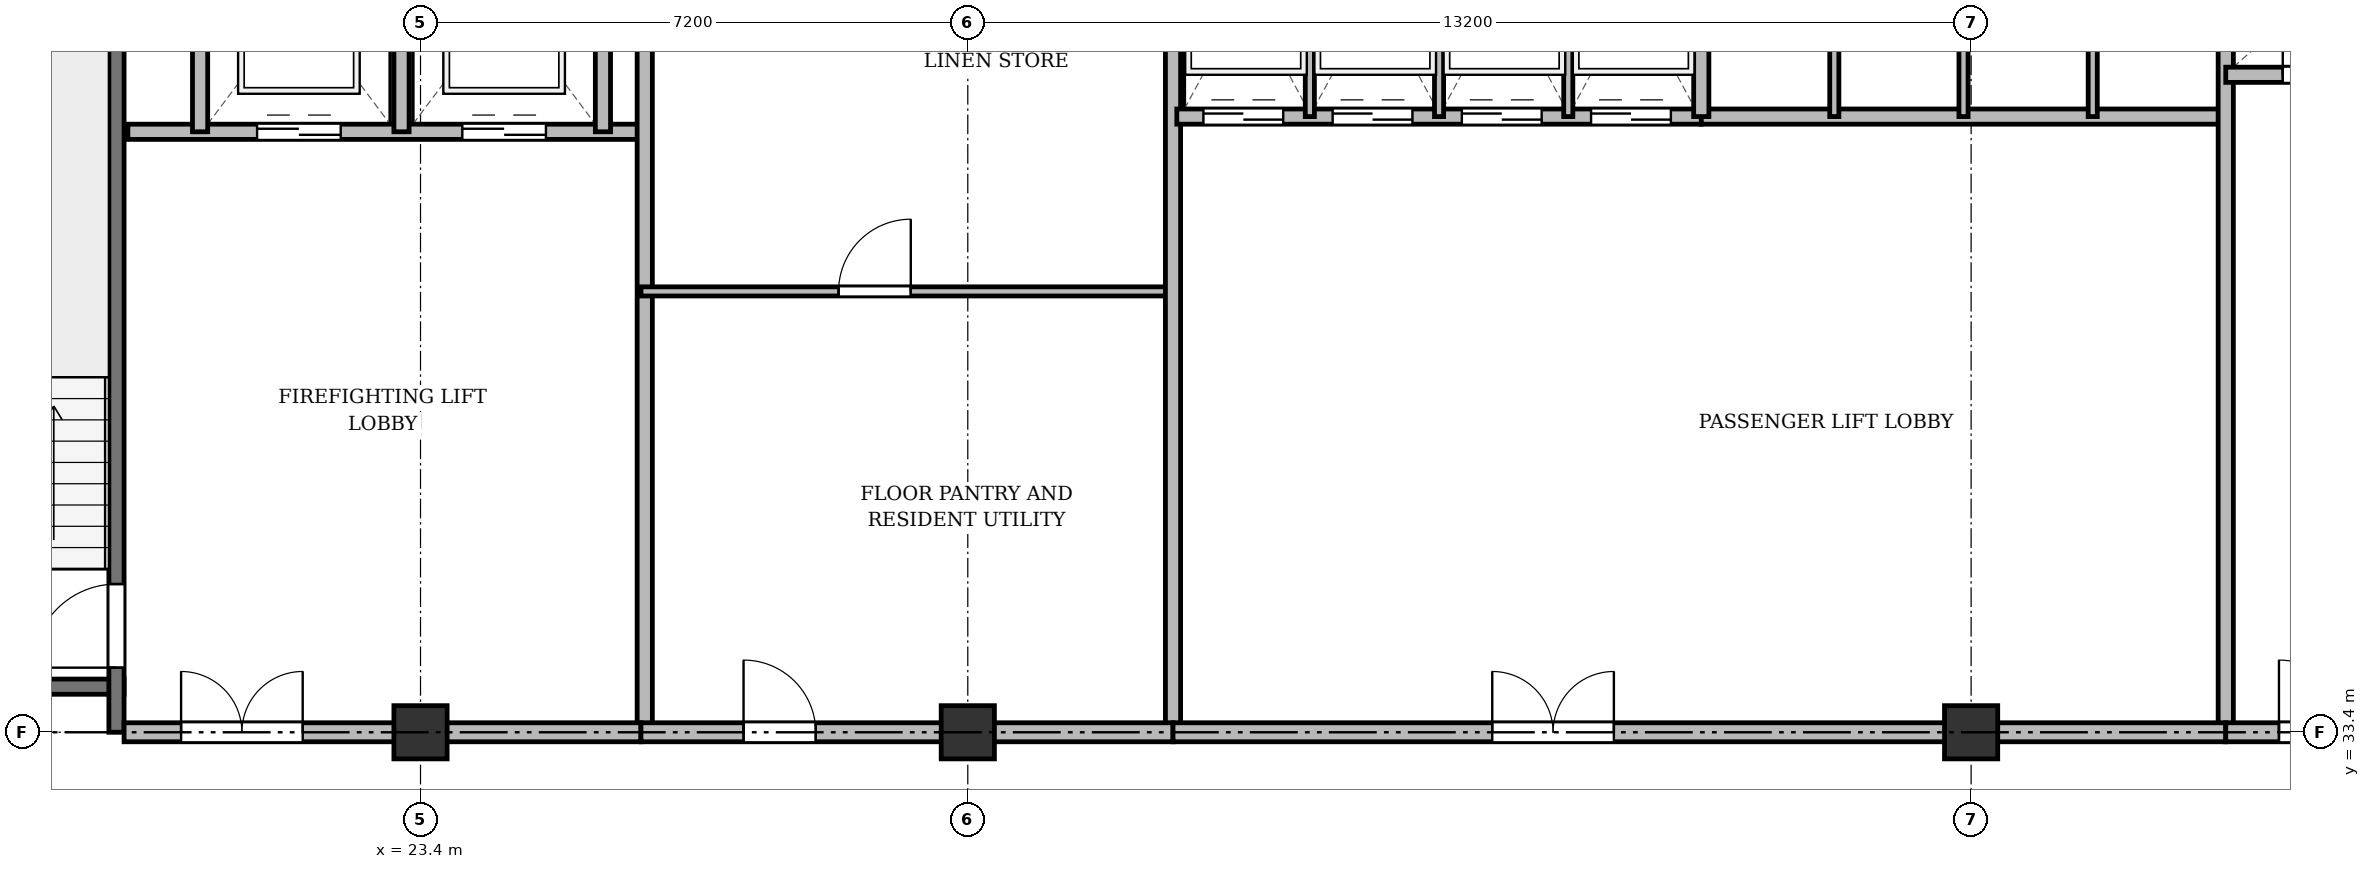
"""IFC4 building model, lengths in metres.
Left out: names, types, materials, properties, quantities, classifications, styles, units other than length and angle.
Written with IfcOpenShell. Run it as: python <this file> out.ifc"""

import sys

from ifc_helpers import new_model, si_unit, direction, frame, frame_2d, origin, origin_2d, place, context, subcontext, project, spatial, rectangle, extrude, source, transform, mapped, element, fill, save


model = new_model("IFC4")
c1 = context("Model", 3, precision=1e-05, world=origin(), true_north=direction((0.0, 1.0)))
c2 = subcontext(c1, "Body", "Model", "MODEL_VIEW")
j1 = project(units=[si_unit("LENGTHUNIT", "METRE"), si_unit("PLANEANGLEUNIT", "RADIAN")], contexts=[c1])
p1 = place(None, origin())
s1 = spatial("IfcSite", under=j1, at=p1, CompositionType="ELEMENT")
p2 = place(p1, origin())
s2 = spatial("IfcBuilding", under=s1, at=p2, CompositionType="ELEMENT")
p3 = place(p2, frame((0.0, 0.0, 212.1)))
s3 = spatial("IfcBuildingStorey", under=s2, at=p3, CompositionType="ELEMENT", Elevation=212.1)
m1 = source(origin(), c2, "Body", "SweptSolid", [
    extrude(rectangle(XDim=0.7, YDim=0.7, at=origin_2d()), origin(), (0.0, 0.0, 1.0), 3.6),
])
for number, where, z_axis, x_axis in (
    (1, (23.4, 33.4, 0.0), (0.0, 0.0, 1.0), (1.0, 0.0, 0.0)),
    (2, (30.6, 33.4, 0.0), (0.0, 0.0, 1.0), (1.0, 0.0, 0.0)),
    (3, (43.8, 33.4, 0.0), (0.0, 0.0, 1.0), (1.0, 0.0, 0.0)),
):
    element("IfcColumn", number, at=place(p3, frame(where, z_axis=z_axis, x_axis=x_axis)), inside=s3, PredefinedType="COLUMN", context=c2, shape_type="MappedRepresentation", body=[
        mapped(m1, transform((0.0, 0.0, 0.0), x_axis=(1.0, 0.0, 0.0), y_axis=(0.0, 1.0, 0.0), z_axis=(0.0, 0.0, 1.0), scale=1.0)),
    ])
p4 = place(p3, frame((16.1, 34.0, 0.0), z_axis=(0.0, 0.0, 1.0), x_axis=(1.0, 0.0, 0.0)))
e4 = element("IfcWall", 4, at=p4, inside=s3, PredefinedType="SHEAR", context=c2, shape_type="SweptSolid", body=[
    extrude(rectangle(XDim=3.4, YDim=0.2, at=frame_2d((1.7, 0.0))), origin(), (0.0, 0.0, 1.0), 3.36),
])
p5 = place(p3, frame((19.4, 33.4, 0.0), z_axis=(0.0, 0.0, 1.0), x_axis=(0.0, 1.0, 0.0)))
e5 = element("IfcWall", 5, at=p5, inside=s3, PredefinedType="SHEAR", context=c2, shape_type="SweptSolid", body=[
    extrude(rectangle(XDim=11.1, YDim=0.2, at=frame_2d((5.55, 0.0))), origin(), (0.0, 0.0, 1.0), 3.36),
])
p6 = place(p5, frame((0.85, 0.0, 0.0)))
e6 = element("IfcOpeningElement", 6, at=p6, cuts=e5, PredefinedType="OPENING", context=c2, shape_type="SweptSolid", body=[
    extrude(rectangle(XDim=1.1, YDim=2.15, at=frame_2d((0.55, 1.075))), frame((0.0, 0.11, 0.0), z_axis=(0.0, -1.0, 0.0), x_axis=(1.0, 0.0, 0.0)), (0.0, 0.0, 1.0), 0.22),
])
p7 = place(p3, frame((19.55, 41.3, 0.0), z_axis=(0.0, 0.0, 1.0), x_axis=(1.0, 0.0, 0.0)))
e7 = element("IfcWall", 7, at=p7, inside=s3, PredefinedType="SOLIDWALL", context=c2, shape_type="SweptSolid", body=[
    extrude(rectangle(XDim=6.75, YDim=0.2, at=frame_2d((3.375, 0.0))), origin(), (0.0, 0.0, 1.0), 3.36),
])
p8 = place(p7, frame((1.7, 0.0, 0.0)))
e8 = element("IfcOpeningElement", 8, at=p8, cuts=e7, PredefinedType="OPENING", context=c2, shape_type="SweptSolid", body=[
    extrude(rectangle(XDim=1.1, YDim=2.15, at=frame_2d((0.55, 1.075))), frame((0.0, 0.11, 0.0), z_axis=(0.0, -1.0, 0.0), x_axis=(1.0, 0.0, 0.0)), (0.0, 0.0, 1.0), 0.22),
])
p9 = place(p7, frame((4.4, 0.0, 0.0)))
e9 = element("IfcOpeningElement", 9, at=p9, cuts=e7, PredefinedType="OPENING", context=c2, shape_type="SweptSolid", body=[
    extrude(rectangle(XDim=1.1, YDim=2.15, at=frame_2d((0.55, 1.075))), frame((0.0, 0.11, 0.0), z_axis=(0.0, -1.0, 0.0), x_axis=(1.0, 0.0, 0.0)), (0.0, 0.0, 1.0), 0.22),
])
for number, where, z_axis, x_axis in (
    (10, (20.5, 41.3, 0.0), (0.0, 0.0, 1.0), (0.0, 1.0, 0.0)),
    (11, (23.15, 41.3, 0.0), (0.0, 0.0, 1.0), (0.0, 1.0, 0.0)),
    (12, (25.8, 41.3, 0.0), (0.0, 0.0, 1.0), (0.0, 1.0, 0.0)),
):
    element("IfcWall", number, at=place(p3, frame(where, z_axis=z_axis, x_axis=x_axis)), inside=s3, PredefinedType="SOLIDWALL", context=c2, shape_type="SweptSolid", body=[
        extrude(rectangle(XDim=3.4, YDim=0.2, at=frame_2d((1.7, 0.0))), origin(), (0.0, 0.0, 1.0), 3.36),
    ])
p10 = place(p3, frame((26.35, 33.4, 0.0), z_axis=(0.0, 0.0, 1.0), x_axis=(0.0, 1.0, 0.0)))
e13 = element("IfcWall", 13, at=p10, inside=s3, PredefinedType="SOLIDWALL", context=c2, shape_type="SweptSolid", body=[
    extrude(rectangle(XDim=11.3, YDim=0.2, at=frame_2d((5.65, 0.0))), origin(), (0.0, 0.0, 1.0), 2.91),
])
p11 = place(p3, frame((19.5, 33.4, 0.0), z_axis=(0.0, 0.0, 1.0), x_axis=(1.0, 0.0, 0.0)))
e14 = element("IfcWall", 14, at=p11, inside=s3, PredefinedType="PARTITIONING", context=c2, shape_type="SweptSolid", body=[
    extrude(rectangle(XDim=6.8, YDim=0.25, at=frame_2d((3.4, 0.0))), origin(), (0.0, 0.0, 1.0), 2.91),
])
p12 = place(p11, frame((0.75, 0.0, 0.0)))
e15 = element("IfcOpeningElement", 15, at=p12, cuts=e14, PredefinedType="OPENING", context=c2, shape_type="SweptSolid", body=[
    extrude(rectangle(XDim=1.6, YDim=2.2, at=frame_2d((0.8, 1.1))), frame((0.0, 0.135, 0.0), z_axis=(0.0, -1.0, 0.0), x_axis=(1.0, 0.0, 0.0)), (0.0, 0.0, 1.0), 0.27),
])
p13 = place(p3, frame((26.3, 39.2, 0.0), z_axis=(0.0, 0.0, 1.0), x_axis=(1.0, 0.0, 0.0)))
e16 = element("IfcWall", 16, at=p13, inside=s3, PredefinedType="PARTITIONING", context=c2, shape_type="SweptSolid", body=[
    extrude(rectangle(XDim=7.0, YDim=0.12, at=frame_2d((3.5, 0.0))), origin(), (0.0, 0.0, 1.0), 2.86),
])
p14 = place(p13, frame((2.6, 0.0, 0.0)))
e17 = element("IfcOpeningElement", 17, at=p14, cuts=e16, PredefinedType="OPENING", context=c2, shape_type="SweptSolid", body=[
    extrude(rectangle(XDim=0.95, YDim=2.15, at=frame_2d((0.475, 1.075))), frame((0.0, 0.07, 0.0), z_axis=(0.0, -1.0, 0.0), x_axis=(1.0, 0.0, 0.0)), (0.0, 0.0, 1.0), 0.14),
])
p15 = place(p3, frame((33.3, 33.4, 0.0), z_axis=(0.0, 0.0, 1.0), x_axis=(0.0, 1.0, 0.0)))
e18 = element("IfcWall", 18, at=p15, inside=s3, PredefinedType="SOLIDWALL", context=c2, shape_type="SweptSolid", body=[
    extrude(rectangle(XDim=11.3, YDim=0.2, at=frame_2d((5.65, 0.0))), origin(), (0.0, 0.0, 1.0), 2.91),
])
p16 = place(p3, frame((33.35, 41.5, 0.0), z_axis=(0.0, 0.0, 1.0), x_axis=(1.0, 0.0, 0.0)))
e19 = element("IfcWall", 19, at=p16, inside=s3, PredefinedType="SOLIDWALL", context=c2, shape_type="SweptSolid", body=[
    extrude(rectangle(XDim=6.9, YDim=0.2, at=frame_2d((3.45, 0.0))), origin(), (0.0, 0.0, 1.0), 3.36),
])
p17 = place(p16, frame((0.35, 0.0, 0.0)))
e20 = element("IfcOpeningElement", 20, at=p17, cuts=e19, PredefinedType="OPENING", context=c2, shape_type="SweptSolid", body=[
    extrude(rectangle(XDim=1.05, YDim=2.15, at=frame_2d((0.525, 1.075))), frame((0.0, 0.11, 0.0), z_axis=(0.0, -1.0, 0.0), x_axis=(1.0, 0.0, 0.0)), (0.0, 0.0, 1.0), 0.22),
])
p18 = place(p16, frame((2.05, 0.0, 0.0)))
e21 = element("IfcOpeningElement", 21, at=p18, cuts=e19, PredefinedType="OPENING", context=c2, shape_type="SweptSolid", body=[
    extrude(rectangle(XDim=1.05, YDim=2.15, at=frame_2d((0.525, 1.075))), frame((0.0, 0.11, 0.0), z_axis=(0.0, -1.0, 0.0), x_axis=(1.0, 0.0, 0.0)), (0.0, 0.0, 1.0), 0.22),
])
p19 = place(p16, frame((3.75, 0.0, 0.0)))
e22 = element("IfcOpeningElement", 22, at=p19, cuts=e19, PredefinedType="OPENING", context=c2, shape_type="SweptSolid", body=[
    extrude(rectangle(XDim=1.05, YDim=2.15, at=frame_2d((0.525, 1.075))), frame((0.0, 0.11, 0.0), z_axis=(0.0, -1.0, 0.0), x_axis=(1.0, 0.0, 0.0)), (0.0, 0.0, 1.0), 0.22),
])
p20 = place(p16, frame((5.45, 0.0, 0.0)))
e23 = element("IfcOpeningElement", 23, at=p20, cuts=e19, PredefinedType="OPENING", context=c2, shape_type="SweptSolid", body=[
    extrude(rectangle(XDim=1.05, YDim=2.15, at=frame_2d((0.525, 1.075))), frame((0.0, 0.11, 0.0), z_axis=(0.0, -1.0, 0.0), x_axis=(1.0, 0.0, 0.0)), (0.0, 0.0, 1.0), 0.22),
])
for number, where, z_axis, x_axis in (
    (24, (35.1, 41.5, 0.0), (0.0, 0.0, 1.0), (0.0, 1.0, 0.0)),
    (25, (36.8, 41.5, 0.0), (0.0, 0.0, 1.0), (0.0, 1.0, 0.0)),
    (26, (38.5, 41.5, 0.0), (0.0, 0.0, 1.0), (0.0, 1.0, 0.0)),
):
    element("IfcWall", number, at=place(p3, frame(where, z_axis=z_axis, x_axis=x_axis)), inside=s3, PredefinedType="PARTITIONING", context=c2, shape_type="SweptSolid", body=[
        extrude(rectangle(XDim=3.2, YDim=0.12, at=frame_2d((1.6, 0.0))), origin(), (0.0, 0.0, 1.0), 3.36),
    ])
p21 = place(p3, frame((40.25, 41.5, 0.0), z_axis=(0.0, 0.0, 1.0), x_axis=(1.0, 0.0, 0.0)))
e27 = element("IfcWall", 27, at=p21, inside=s3, PredefinedType="SOLIDWALL", context=c2, shape_type="SweptSolid", body=[
    extrude(rectangle(XDim=6.9, YDim=0.2, at=frame_2d((3.45, 0.0))), origin(), (0.0, 0.0, 1.0), 3.36),
])
p22 = place(p3, frame((40.25, 41.5, 0.0), z_axis=(0.0, 0.0, 1.0), x_axis=(0.0, 1.0, 0.0)))
e28 = element("IfcWall", 28, at=p22, inside=s3, PredefinedType="SOLIDWALL", context=c2, shape_type="SweptSolid", body=[
    extrude(rectangle(XDim=3.2, YDim=0.2, at=frame_2d((1.6, 0.0))), origin(), (0.0, 0.0, 1.0), 3.36),
])
for number, where, z_axis, x_axis in (
    (29, (42.0, 41.5, 0.0), (0.0, 0.0, 1.0), (0.0, 1.0, 0.0)),
    (30, (43.7, 41.5, 0.0), (0.0, 0.0, 1.0), (0.0, 1.0, 0.0)),
    (31, (45.4, 41.5, 0.0), (0.0, 0.0, 1.0), (0.0, 1.0, 0.0)),
):
    element("IfcWall", number, at=place(p3, frame(where, z_axis=z_axis, x_axis=x_axis)), inside=s3, PredefinedType="PARTITIONING", context=c2, shape_type="SweptSolid", body=[
        extrude(rectangle(XDim=3.2, YDim=0.12, at=frame_2d((1.6, 0.0))), origin(), (0.0, 0.0, 1.0), 3.36),
    ])
p23 = place(p3, frame((47.15, 33.4, 0.0), z_axis=(0.0, 0.0, 1.0), x_axis=(0.0, 1.0, 0.0)))
e32 = element("IfcWall", 32, at=p23, inside=s3, PredefinedType="SOLIDWALL", context=c2, shape_type="SweptSolid", body=[
    extrude(rectangle(XDim=11.3, YDim=0.2, at=frame_2d((5.65, 0.0))), origin(), (0.0, 0.0, 1.0), 2.91),
])
p24 = place(p3, frame((26.3, 33.4, 0.0), z_axis=(0.0, 0.0, 1.0), x_axis=(1.0, 0.0, 0.0)))
e33 = element("IfcWall", 33, at=p24, inside=s3, PredefinedType="PARTITIONING", context=c2, shape_type="SweptSolid", body=[
    extrude(rectangle(XDim=7.0, YDim=0.25, at=frame_2d((3.5, 0.0))), origin(), (0.0, 0.0, 1.0), 2.91),
])
p25 = place(p24, frame((1.35, 0.0, 0.0)))
e34 = element("IfcOpeningElement", 34, at=p25, cuts=e33, PredefinedType="OPENING", context=c2, shape_type="SweptSolid", body=[
    extrude(rectangle(XDim=0.95, YDim=2.15, at=frame_2d((0.475, 1.075))), frame((0.0, 0.135, 0.0), z_axis=(0.0, -1.0, 0.0), x_axis=(1.0, 0.0, 0.0)), (0.0, 0.0, 1.0), 0.27),
])
p26 = place(p3, frame((33.3, 33.4, 0.0), z_axis=(0.0, 0.0, 1.0), x_axis=(1.0, 0.0, 0.0)))
e35 = element("IfcWall", 35, at=p26, inside=s3, PredefinedType="PARTITIONING", context=c2, shape_type="SweptSolid", body=[
    extrude(rectangle(XDim=13.85, YDim=0.25, at=frame_2d((6.925, 0.0))), origin(), (0.0, 0.0, 1.0), 2.91),
])
p27 = place(p26, frame((4.2, 0.0, 0.0)))
e36 = element("IfcOpeningElement", 36, at=p27, cuts=e35, PredefinedType="OPENING", context=c2, shape_type="SweptSolid", body=[
    extrude(rectangle(XDim=1.6, YDim=2.2, at=frame_2d((0.8, 1.1))), frame((0.0, 0.135, 0.0), z_axis=(0.0, -1.0, 0.0), x_axis=(1.0, 0.0, 0.0)), (0.0, 0.0, 1.0), 0.27),
])
p28 = place(p3, frame((47.15, 42.05, 0.0), z_axis=(0.0, 0.0, 1.0), x_axis=(1.0, 0.0, 0.0)))
e37 = element("IfcWall", 37, at=p28, inside=s3, PredefinedType="SOLIDWALL", context=c2, shape_type="SweptSolid", body=[
    extrude(rectangle(XDim=7.85, YDim=0.2, at=frame_2d((3.925, 0.0))), origin(), (0.0, 0.0, 1.0), 2.86),
])
p29 = place(p28, frame((0.75, 0.0, 0.0)))
e38 = element("IfcOpeningElement", 38, at=p29, cuts=e37, PredefinedType="OPENING", context=c2, shape_type="SweptSolid", body=[
    extrude(rectangle(XDim=0.9, YDim=2.1, at=frame_2d((0.45, 1.05))), frame((0.0, 0.11, 0.0), z_axis=(0.0, -1.0, 0.0), x_axis=(1.0, 0.0, 0.0)), (0.0, 0.0, 1.0), 0.22),
])
p30 = place(p28, frame((3.85, 0.0, 0.0)))
e39 = element("IfcOpeningElement", 39, at=p30, cuts=e37, PredefinedType="OPENING", context=c2, shape_type="SweptSolid", body=[
    extrude(rectangle(XDim=0.9, YDim=2.1, at=frame_2d((0.45, 1.05))), frame((0.0, 0.11, 0.0), z_axis=(0.0, -1.0, 0.0), x_axis=(1.0, 0.0, 0.0)), (0.0, 0.0, 1.0), 0.22),
])
p31 = place(p3, frame((47.15, 33.4, 0.0), z_axis=(0.0, 0.0, 1.0), x_axis=(1.0, 0.0, 0.0)))
e40 = element("IfcWall", 40, at=p31, inside=s3, PredefinedType="PARTITIONING", context=c2, shape_type="SweptSolid", body=[
    extrude(rectangle(XDim=11.15, YDim=0.25, at=frame_2d((5.575, 0.0))), origin(), (0.0, 0.0, 1.0), 2.91),
])
p32 = place(p31, frame((0.7, 0.0, 0.0)))
e41 = element("IfcOpeningElement", 41, at=p32, cuts=e40, PredefinedType="OPENING", context=c2, shape_type="SweptSolid", body=[
    extrude(rectangle(XDim=0.95, YDim=2.15, at=frame_2d((0.475, 1.075))), frame((0.0, 0.135, 0.0), z_axis=(0.0, -1.0, 0.0), x_axis=(1.0, 0.0, 0.0)), (0.0, 0.0, 1.0), 0.27),
])
p33 = place(p31, frame((6.0, 0.0, 0.0)))
e42 = element("IfcOpeningElement", 42, at=p33, cuts=e40, PredefinedType="OPENING", context=c2, shape_type="SweptSolid", body=[
    extrude(rectangle(XDim=1.2, YDim=2.15, at=frame_2d((0.6, 1.075))), frame((0.0, 0.135, 0.0), z_axis=(0.0, -1.0, 0.0), x_axis=(1.0, 0.0, 0.0)), (0.0, 0.0, 1.0), 0.27),
])
m2 = source(origin(), c2, "Body", "SweptSolid", [
    extrude(rectangle(XDim=1.1, YDim=2.15, at=frame_2d((0.55, 1.075))), frame((0.0, 0.025, 0.0), z_axis=(0.0, -1.0, 0.0), x_axis=(1.0, 0.0, 0.0)), (0.0, 0.0, 1.0), 0.05),
])
p34 = place(p6, origin())
e43 = element("IfcDoor", 43, at=p34, inside=s3, OperationType="SINGLE_SWING_LEFT", PredefinedType="DOOR", context=c2, shape_type="MappedRepresentation", body=[
    mapped(m2, transform((0.0, 0.0, 0.0), x_axis=(1.0, 0.0, 0.0), y_axis=(0.0, 1.0, 0.0), z_axis=(0.0, 0.0, 1.0), scale=1.0)),
])
fill(e6, e43)
p35 = place(p8, origin())
e44 = element("IfcDoor", 44, at=p35, inside=s3, OperationType="DOUBLE_DOOR_SLIDING", PredefinedType="DOOR", context=c2, shape_type="MappedRepresentation", body=[
    mapped(m2, transform((0.0, 0.0, 0.0), x_axis=(1.0, 0.0, 0.0), y_axis=(0.0, 1.0, 0.0), z_axis=(0.0, 0.0, 1.0), scale=1.0)),
])
fill(e8, e44)
p36 = place(p9, origin())
e45 = element("IfcDoor", 45, at=p36, inside=s3, OperationType="DOUBLE_DOOR_SLIDING", PredefinedType="DOOR", context=c2, shape_type="MappedRepresentation", body=[
    mapped(m2, transform((0.0, 0.0, 0.0), x_axis=(1.0, 0.0, 0.0), y_axis=(0.0, 1.0, 0.0), z_axis=(0.0, 0.0, 1.0), scale=1.0)),
])
fill(e9, e45)
m3 = source(origin(), c2, "Body", "SweptSolid", [
    extrude(rectangle(XDim=1.6, YDim=2.2, at=frame_2d((0.8, 1.1))), frame((0.0, 0.025, 0.0), z_axis=(0.0, -1.0, 0.0), x_axis=(1.0, 0.0, 0.0)), (0.0, 0.0, 1.0), 0.05),
])
p37 = place(p12, origin())
e46 = element("IfcDoor", 46, at=p37, inside=s3, OperationType="DOUBLE_DOOR_SINGLE_SWING", PredefinedType="DOOR", context=c2, shape_type="MappedRepresentation", body=[
    mapped(m3, transform((0.0, 0.0, 0.0), x_axis=(1.0, 0.0, 0.0), y_axis=(0.0, 1.0, 0.0), z_axis=(0.0, 0.0, 1.0), scale=1.0)),
])
fill(e15, e46)
m4 = source(origin(), c2, "Body", "SweptSolid", [
    extrude(rectangle(XDim=0.95, YDim=2.15, at=frame_2d((0.475, 1.075))), frame((0.0, 0.025, 0.0), z_axis=(0.0, -1.0, 0.0), x_axis=(1.0, 0.0, 0.0)), (0.0, 0.0, 1.0), 0.05),
])
p38 = place(p14, origin())
e47 = element("IfcDoor", 47, at=p38, inside=s3, OperationType="SINGLE_SWING_RIGHT", PredefinedType="DOOR", context=c2, shape_type="MappedRepresentation", body=[
    mapped(m4, transform((0.0, 0.0, 0.0), x_axis=(1.0, 0.0, 0.0), y_axis=(0.0, 1.0, 0.0), z_axis=(0.0, 0.0, 1.0), scale=1.0)),
])
fill(e17, e47)
m5 = source(origin(), c2, "Body", "SweptSolid", [
    extrude(rectangle(XDim=1.05, YDim=2.15, at=frame_2d((0.525, 1.075))), frame((0.0, 0.025, 0.0), z_axis=(0.0, -1.0, 0.0), x_axis=(1.0, 0.0, 0.0)), (0.0, 0.0, 1.0), 0.05),
])
p39 = place(p17, origin())
e48 = element("IfcDoor", 48, at=p39, inside=s3, OperationType="DOUBLE_DOOR_SLIDING", PredefinedType="DOOR", context=c2, shape_type="MappedRepresentation", body=[
    mapped(m5, transform((0.0, 0.0, 0.0), x_axis=(1.0, 0.0, 0.0), y_axis=(0.0, 1.0, 0.0), z_axis=(0.0, 0.0, 1.0), scale=1.0)),
])
fill(e20, e48)
p40 = place(p18, origin())
e49 = element("IfcDoor", 49, at=p40, inside=s3, OperationType="DOUBLE_DOOR_SLIDING", PredefinedType="DOOR", context=c2, shape_type="MappedRepresentation", body=[
    mapped(m5, transform((0.0, 0.0, 0.0), x_axis=(1.0, 0.0, 0.0), y_axis=(0.0, 1.0, 0.0), z_axis=(0.0, 0.0, 1.0), scale=1.0)),
])
fill(e21, e49)
p41 = place(p19, origin())
e50 = element("IfcDoor", 50, at=p41, inside=s3, OperationType="DOUBLE_DOOR_SLIDING", PredefinedType="DOOR", context=c2, shape_type="MappedRepresentation", body=[
    mapped(m5, transform((0.0, 0.0, 0.0), x_axis=(1.0, 0.0, 0.0), y_axis=(0.0, 1.0, 0.0), z_axis=(0.0, 0.0, 1.0), scale=1.0)),
])
fill(e22, e50)
p42 = place(p20, origin())
e51 = element("IfcDoor", 51, at=p42, inside=s3, OperationType="DOUBLE_DOOR_SLIDING", PredefinedType="DOOR", context=c2, shape_type="MappedRepresentation", body=[
    mapped(m5, transform((0.0, 0.0, 0.0), x_axis=(1.0, 0.0, 0.0), y_axis=(0.0, 1.0, 0.0), z_axis=(0.0, 0.0, 1.0), scale=1.0)),
])
fill(e23, e51)
p43 = place(p25, origin())
e52 = element("IfcDoor", 52, at=p43, inside=s3, OperationType="SINGLE_SWING_LEFT", PredefinedType="DOOR", context=c2, shape_type="MappedRepresentation", body=[
    mapped(m4, transform((0.0, 0.0, 0.0), x_axis=(1.0, 0.0, 0.0), y_axis=(0.0, 1.0, 0.0), z_axis=(0.0, 0.0, 1.0), scale=1.0)),
])
fill(e34, e52)
p44 = place(p27, origin())
e53 = element("IfcDoor", 53, at=p44, inside=s3, OperationType="DOUBLE_DOOR_SINGLE_SWING", PredefinedType="DOOR", context=c2, shape_type="MappedRepresentation", body=[
    mapped(m3, transform((0.0, 0.0, 0.0), x_axis=(1.0, 0.0, 0.0), y_axis=(0.0, 1.0, 0.0), z_axis=(0.0, 0.0, 1.0), scale=1.0)),
])
fill(e36, e53)
m6 = source(origin(), c2, "Body", "SweptSolid", [
    extrude(rectangle(XDim=0.9, YDim=2.1, at=frame_2d((0.45, 1.05))), frame((0.0, 0.025, 0.0), z_axis=(0.0, -1.0, 0.0), x_axis=(1.0, 0.0, 0.0)), (0.0, 0.0, 1.0), 0.05),
])
p45 = place(p29, origin())
e54 = element("IfcDoor", 54, at=p45, inside=s3, OperationType="SINGLE_SWING_LEFT", PredefinedType="DOOR", context=c2, shape_type="MappedRepresentation", body=[
    mapped(m6, transform((0.0, 0.0, 0.0), x_axis=(1.0, 0.0, 0.0), y_axis=(0.0, 1.0, 0.0), z_axis=(0.0, 0.0, 1.0), scale=1.0)),
])
fill(e38, e54)
p46 = place(p32, origin())
e55 = element("IfcDoor", 55, at=p46, inside=s3, OperationType="SINGLE_SWING_LEFT", PredefinedType="DOOR", context=c2, shape_type="MappedRepresentation", body=[
    mapped(m4, transform((0.0, 0.0, 0.0), x_axis=(1.0, 0.0, 0.0), y_axis=(0.0, 1.0, 0.0), z_axis=(0.0, 0.0, 1.0), scale=1.0)),
])
fill(e41, e55)
save(model, sys.argv[1])
